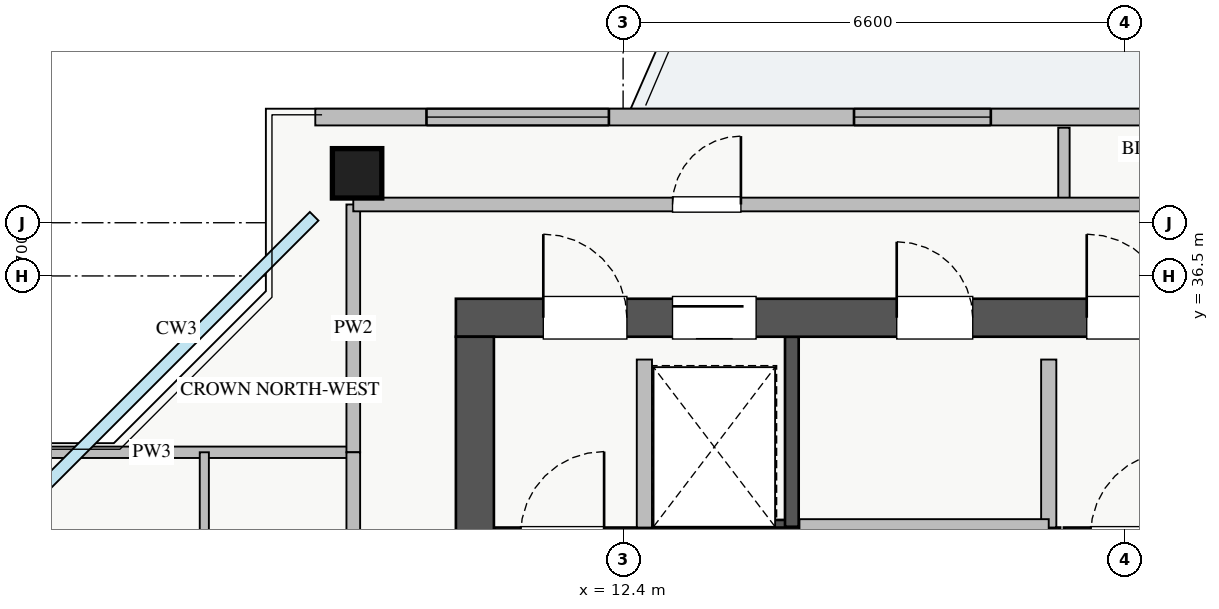
"""IFC4 building model, lengths in metres.
Left out: names, types, materials, properties, quantities, classifications, styles, units other than length and angle.
Written with IfcOpenShell. Run it as: python <this file> out.ifc"""

import sys

from ifc_helpers import new_model, si_unit, direction, frame, frame_2d, origin, origin_2d, place, context, subcontext, project, spatial, rectangle, extrude, source, transform, mapped, element, fill, save


model = new_model("IFC4")
c1 = context("Model", 3, precision=1e-05, world=origin(), true_north=direction((0.0, 1.0)))
c2 = subcontext(c1, "Body", "Model", "MODEL_VIEW")
j1 = project(units=[si_unit("LENGTHUNIT", "METRE"), si_unit("PLANEANGLEUNIT", "RADIAN")], contexts=[c1])
p1 = place(None, origin())
s1 = spatial("IfcSite", under=j1, at=p1, CompositionType="ELEMENT")
p2 = place(p1, origin())
s2 = spatial("IfcBuilding", under=s1, at=p2, CompositionType="ELEMENT")
p3 = place(p2, frame((0.0, 0.0, 247.0)))
s3 = spatial("IfcBuildingStorey", under=s2, at=p3, CompositionType="ELEMENT", Elevation=247.0)
p4 = place(p3, frame((12.68, 33.2, 0.0), z_axis=(0.0, 0.0, 1.0), x_axis=(1.0, 0.0, 0.0)))
e1 = element("IfcWall", 1, at=p4, inside=s3, PredefinedType="SHEAR", context=c2, shape_type="SweptSolid", body=[
    extrude(rectangle(XDim=1.94, YDim=0.18, at=frame_2d((0.97, 0.0))), origin(), (0.0, 0.0, 1.0), 3.07),
])
p5 = place(p3, frame((14.62, 33.2, 0.0), z_axis=(0.0, 0.0, 1.0), x_axis=(0.0, 1.0, 0.0)))
e2 = element("IfcWall", 2, at=p5, inside=s3, PredefinedType="SHEAR", context=c2, shape_type="SweptSolid", body=[
    extrude(rectangle(XDim=2.5, YDim=0.18, at=frame_2d((1.25, 0.0))), origin(), (0.0, 0.0, 1.0), 3.07),
])
p6 = place(p3, frame((10.7, 33.09, 0.0), z_axis=(0.0, 0.0, 1.0), x_axis=(1.0, 0.0, 0.0)))
e3 = element("IfcWall", 3, at=p6, inside=s3, PredefinedType="SHEAR", context=c2, shape_type="SweptSolid", body=[
    extrude(rectangle(XDim=7.45, YDim=0.2, at=frame_2d((3.725, 0.0))), origin(), (0.0, 0.0, 1.0), 3.25),
])
p7 = place(p6, frame((0.35, 0.0, 0.0)))
e4 = element("IfcOpeningElement", 4, at=p7, cuts=e3, PredefinedType="OPENING", context=c2, shape_type="SweptSolid", body=[
    extrude(rectangle(XDim=1.1, YDim=2.05, at=frame_2d((0.55, 1.025))), frame((0.0, 0.11, 0.0), z_axis=(0.0, -1.0, 0.0), x_axis=(1.0, 0.0, 0.0)), (0.0, 0.0, 1.0), 0.22),
])
p8 = place(p3, frame((18.2, 33.09, 0.0), z_axis=(0.0, 0.0, 1.0), x_axis=(1.0, 0.0, 0.0)))
e5 = element("IfcWall", 5, at=p8, inside=s3, PredefinedType="SHEAR", context=c2, shape_type="SweptSolid", body=[
    extrude(rectangle(XDim=7.15, YDim=0.2, at=frame_2d((3.575, 0.0))), origin(), (0.0, 0.0, 1.0), 3.25),
])
p9 = place(p8, frame((0.35, 0.0, 0.0)))
e6 = element("IfcOpeningElement", 6, at=p9, cuts=e5, PredefinedType="OPENING", context=c2, shape_type="SweptSolid", body=[
    extrude(rectangle(XDim=1.1, YDim=2.05, at=frame_2d((0.55, 1.025))), frame((0.0, 0.11, 0.0), z_axis=(0.0, -1.0, 0.0), x_axis=(1.0, 0.0, 0.0)), (0.0, 0.0, 1.0), 0.22),
])
p10 = place(p3, frame((10.2, 35.95, 0.0), z_axis=(0.0, 0.0, 1.0), x_axis=(1.0, 0.0, 0.0)))
e7 = element("IfcWall", 7, at=p10, inside=s3, PredefinedType="SHEAR", context=c2, shape_type="SweptSolid", body=[
    extrude(rectangle(XDim=17.6, YDim=0.5, at=frame_2d((8.8, 0.0))), origin(), (0.0, 0.0, 1.0), 3.25),
])
p11 = place(p10, frame((1.15, 0.0, 0.0)))
e8 = element("IfcOpeningElement", 8, at=p11, cuts=e7, PredefinedType="OPENING", context=c2, shape_type="SweptSolid", body=[
    extrude(rectangle(XDim=1.1, YDim=2.05, at=frame_2d((0.55, 1.025))), frame((0.0, 0.26, 0.0), z_axis=(0.0, -1.0, 0.0), x_axis=(1.0, 0.0, 0.0)), (0.0, 0.0, 1.0), 0.52),
])
p12 = place(p10, frame((8.3, 0.0, 0.0)))
e9 = element("IfcOpeningElement", 9, at=p12, cuts=e7, PredefinedType="OPENING", context=c2, shape_type="SweptSolid", body=[
    extrude(rectangle(XDim=1.1, YDim=2.05, at=frame_2d((0.55, 1.025))), frame((0.0, 0.26, 0.0), z_axis=(0.0, -1.0, 0.0), x_axis=(1.0, 0.0, 0.0)), (0.0, 0.0, 1.0), 0.52),
])
p13 = place(p10, frame((2.85, 0.0, 0.0)))
e10 = element("IfcOpeningElement", 10, at=p13, cuts=e7, PredefinedType="OPENING", context=c2, shape_type="SweptSolid", body=[
    extrude(rectangle(XDim=1.1, YDim=2.05, at=frame_2d((0.55, 1.025))), frame((0.0, 0.26, 0.0), z_axis=(0.0, -1.0, 0.0), x_axis=(1.0, 0.0, 0.0)), (0.0, 0.0, 1.0), 0.52),
])
p14 = place(p10, frame((5.8, 0.0, 0.0)))
e11 = element("IfcOpeningElement", 11, at=p14, cuts=e7, PredefinedType="OPENING", context=c2, shape_type="SweptSolid", body=[
    extrude(rectangle(XDim=1.0, YDim=2.05, at=frame_2d((0.5, 1.025))), frame((0.0, 0.26, 0.0), z_axis=(0.0, -1.0, 0.0), x_axis=(1.0, 0.0, 0.0)), (0.0, 0.0, 1.0), 0.52),
])
p15 = place(p10, frame((14.74, 0.0, 0.0)))
e12 = element("IfcOpeningElement", 12, at=p15, cuts=e7, PredefinedType="OPENING", context=c2, shape_type="SweptSolid", body=[
    extrude(rectangle(XDim=1.0, YDim=2.05, at=frame_2d((0.5, 1.025))), frame((0.0, 0.26, 0.0), z_axis=(0.0, -1.0, 0.0), x_axis=(1.0, 0.0, 0.0)), (0.0, 0.0, 1.0), 0.52),
])
p16 = place(p10, frame((10.175, 0.0, 0.0)))
e13 = element("IfcOpeningElement", 13, at=p16, cuts=e7, PredefinedType="OPENING", context=c2, shape_type="SweptSolid", body=[
    extrude(rectangle(XDim=1.0, YDim=2.05, at=frame_2d((0.5, 1.025))), frame((0.0, 0.26, 0.0), z_axis=(0.0, -1.0, 0.0), x_axis=(1.0, 0.0, 0.0)), (0.0, 0.0, 1.0), 0.52),
])
p17 = place(p10, frame((12.625, 0.0, 0.0)))
e14 = element("IfcOpeningElement", 14, at=p17, cuts=e7, PredefinedType="OPENING", context=c2, shape_type="SweptSolid", body=[
    extrude(rectangle(XDim=1.0, YDim=2.05, at=frame_2d((0.5, 1.025))), frame((0.0, 0.26, 0.0), z_axis=(0.0, -1.0, 0.0), x_axis=(1.0, 0.0, 0.0)), (0.0, 0.0, 1.0), 0.52),
])
p18 = place(p3, frame((10.45, 29.5, 0.0), z_axis=(0.0, 0.0, 1.0), x_axis=(0.0, 1.0, 0.0)))
e15 = element("IfcWall", 15, at=p18, inside=s3, PredefinedType="SHEAR", context=c2, shape_type="SweptSolid", body=[
    extrude(rectangle(XDim=6.2, YDim=0.5, at=frame_2d((3.1, 0.0))), origin(), (0.0, 0.0, 1.0), 3.25),
])
m1 = source(origin(), c2, "Body", "SweptSolid", [
    extrude(rectangle(XDim=0.65, YDim=0.65, at=origin_2d()), origin(), (0.0, 0.0, 1.0), 3.25),
])
p19 = place(p3, frame((8.9, 37.85, 0.0), z_axis=(0.0, 0.0, 1.0), x_axis=(1.0, 0.0, 0.0)))
e16 = element("IfcColumn", 16, at=p19, inside=s3, PredefinedType="COLUMN", context=c2, shape_type="MappedRepresentation", body=[
    mapped(m1, transform((0.0, 0.0, 0.0), x_axis=(1.0, 0.0, 0.0), y_axis=(0.0, 1.0, 0.0), z_axis=(0.0, 0.0, 1.0), scale=1.0)),
])
p20 = place(p3, frame((8.35, 38.59, 0.0), z_axis=(0.0, 0.0, 1.0), x_axis=(1.0, 0.0, 0.0)))
e17 = element("IfcWall", 17, at=p20, inside=s3, PredefinedType="STANDARD", context=c2, shape_type="SweptSolid", body=[
    extrude(rectangle(XDim=21.3, YDim=0.22, at=frame_2d((10.65, 0.0))), origin(), (0.0, 0.0, 1.0), 2.61),
])
p21 = place(p20, frame((11.5, 0.0, 0.0)))
e18 = element("IfcOpeningElement", 18, at=p21, cuts=e17, PredefinedType="OPENING", context=c2, shape_type="SweptSolid", body=[
    extrude(rectangle(XDim=1.2, YDim=2.1, at=frame_2d((0.6, 1.05))), frame((0.0, 0.12, 0.0), z_axis=(0.0, -1.0, 0.0), x_axis=(1.0, 0.0, 0.0)), (0.0, 0.0, 1.0), 0.24),
])
p22 = place(p20, frame((1.463, 0.0, 0.9)))
e19 = element("IfcOpeningElement", 19, at=p22, cuts=e17, PredefinedType="OPENING", context=c2, shape_type="SweptSolid", body=[
    extrude(rectangle(XDim=2.4, YDim=1.48, at=frame_2d((1.2, 0.74))), frame((0.0, 0.12, 0.0), z_axis=(0.0, -1.0, 0.0), x_axis=(1.0, 0.0, 0.0)), (0.0, 0.0, 1.0), 0.24),
])
p23 = place(p20, frame((7.088, 0.0, 0.9)))
e20 = element("IfcOpeningElement", 20, at=p23, cuts=e17, PredefinedType="OPENING", context=c2, shape_type="SweptSolid", body=[
    extrude(rectangle(XDim=1.8, YDim=1.45, at=frame_2d((0.9, 0.725))), frame((0.0, 0.12, 0.0), z_axis=(0.0, -1.0, 0.0), x_axis=(1.0, 0.0, 0.0)), (0.0, 0.0, 1.0), 0.24),
])
p24 = place(p20, frame((19.775, 0.0, 0.9)))
e21 = element("IfcOpeningElement", 21, at=p24, cuts=e17, PredefinedType="OPENING", context=c2, shape_type="SweptSolid", body=[
    extrude(rectangle(XDim=1.2, YDim=1.4, at=frame_2d((0.6, 0.7))), frame((0.0, 0.12, 0.0), z_axis=(0.0, -1.0, 0.0), x_axis=(1.0, 0.0, 0.0)), (0.0, 0.0, 1.0), 0.24),
])
p25 = place(p20, frame((14.86, 0.0, 0.9)))
e22 = element("IfcOpeningElement", 22, at=p25, cuts=e17, PredefinedType="OPENING", context=c2, shape_type="SweptSolid", body=[
    extrude(rectangle(XDim=2.4, YDim=1.5, at=frame_2d((1.2, 0.75))), frame((0.0, 0.12, 0.0), z_axis=(0.0, -1.0, 0.0), x_axis=(1.0, 0.0, 0.0)), (0.0, 0.0, 1.0), 0.24),
])
for number, where, z_axis, x_axis in (
    (23, (12.68, 33.19, 0.0), (0.0, 0.0, 1.0), (0.0, 1.0, 0.0)),
    (24, (18.0, 33.19, 0.0), (0.0, 0.0, 1.0), (0.0, 1.0, 0.0)),
):
    element("IfcWall", number, at=place(p3, frame(where, z_axis=z_axis, x_axis=x_axis)), inside=s3, PredefinedType="PARTITIONING", context=c2, shape_type="SweptSolid", body=[
        extrude(rectangle(XDim=2.21, YDim=0.2, at=frame_2d((1.105, 0.0))), origin(), (0.0, 0.0, 1.0), 3.07),
    ])
p26 = place(p3, frame((14.72, 33.2, 0.0), z_axis=(0.0, 0.0, 1.0), x_axis=(1.0, 0.0, 0.0)))
e25 = element("IfcWall", 25, at=p26, inside=s3, PredefinedType="PARTITIONING", context=c2, shape_type="SweptSolid", body=[
    extrude(rectangle(XDim=3.28, YDim=0.2, at=frame_2d((1.64, 0.0))), origin(), (0.0, 0.0, 1.0), 3.07),
])
p27 = place(p3, frame((3.55, 34.18, 0.0), z_axis=(0.0, 0.0, 1.0), x_axis=(1.0, 0.0, 0.0)))
e26 = element("IfcWall", 26, at=p27, inside=s3, PredefinedType="PARTITIONING", context=c2, shape_type="SweptSolid", body=[
    extrude(rectangle(XDim=5.3, YDim=0.15, at=frame_2d((2.65, 0.0))), origin(), (0.0, 0.0, 1.0), 3.07),
])
p28 = place(p3, frame((8.85, 34.18, 0.0), z_axis=(0.0, 0.0, 1.0), x_axis=(0.0, 1.0, 0.0)))
e27 = element("IfcWall", 27, at=p28, inside=s3, PredefinedType="PARTITIONING", context=c2, shape_type="SweptSolid", body=[
    extrude(rectangle(XDim=3.26, YDim=0.18, at=frame_2d((1.63, 0.0))), origin(), (0.0, 0.0, 1.0), 2.569),
])
p29 = place(p3, frame((18.2, 37.44, 0.0), z_axis=(0.0, 0.0, 1.0), x_axis=(0.0, 1.0, 0.0)))
e28 = element("IfcWall", 28, at=p29, inside=s3, PredefinedType="PARTITIONING", context=c2, shape_type="SweptSolid", body=[
    extrude(rectangle(XDim=1.01, YDim=0.15, at=frame_2d((0.505, 0.0))), origin(), (0.0, 0.0, 1.0), 3.07),
])
p30 = place(p3, frame((8.85, 37.44, 0.0), z_axis=(0.0, 0.0, 1.0), x_axis=(1.0, 0.0, 0.0)))
e29 = element("IfcWall", 29, at=p30, inside=s3, PredefinedType="PARTITIONING", context=c2, shape_type="SweptSolid", body=[
    extrude(rectangle(XDim=18.95, YDim=0.18, at=frame_2d((9.475, 0.0))), origin(), (0.0, 0.0, 1.0), 3.07),
])
p31 = place(p30, frame((4.2, 0.0, 0.0)))
e30 = element("IfcOpeningElement", 30, at=p31, cuts=e29, PredefinedType="OPENING", context=c2, shape_type="SweptSolid", body=[
    extrude(rectangle(XDim=0.9, YDim=2.05, at=frame_2d((0.45, 1.025))), frame((0.0, 0.1, 0.0), z_axis=(0.0, -1.0, 0.0), x_axis=(1.0, 0.0, 0.0)), (0.0, 0.0, 1.0), 0.2),
])
p32 = place(p30, frame((12.8, 0.0, 0.0)))
e31 = element("IfcOpeningElement", 31, at=p32, cuts=e29, PredefinedType="OPENING", context=c2, shape_type="SweptSolid", body=[
    extrude(rectangle(XDim=0.9, YDim=2.05, at=frame_2d((0.45, 1.025))), frame((0.0, 0.1, 0.0), z_axis=(0.0, -1.0, 0.0), x_axis=(1.0, 0.0, 0.0)), (0.0, 0.0, 1.0), 0.2),
])
p33 = place(p3, frame((6.89, 29.29, 0.0), z_axis=(0.0, 0.0, 1.0), x_axis=(0.0, 1.0, 0.0)))
e32 = element("IfcWall", 32, at=p33, inside=s3, PredefinedType="PLUMBINGWALL", context=c2, shape_type="SweptSolid", body=[
    extrude(rectangle(XDim=4.89, YDim=0.12, at=frame_2d((2.445, 0.0))), origin(), (0.0, 0.0, 1.0), 3.07),
])
p34 = place(p3, frame((8.85, 11.82, 0.0), z_axis=(0.0, 0.0, 1.0), x_axis=(0.0, 1.0, 0.0)))
e33 = element("IfcWall", 33, at=p34, inside=s3, PredefinedType="PARTITIONING", context=c2, shape_type="SweptSolid", body=[
    extrude(rectangle(XDim=22.36, YDim=0.18, at=frame_2d((11.18, 0.0))), origin(), (0.0, 0.0, 1.0), 2.569),
])
p35 = place(p34, frame((2.475, 0.0, 0.0)))
e34 = element("IfcOpeningElement", 34, at=p35, cuts=e33, PredefinedType="OPENING", context=c2, shape_type="SweptSolid", body=[
    extrude(rectangle(XDim=1.0, YDim=2.05, at=frame_2d((0.5, 1.025))), frame((0.0, 0.1, 0.0), z_axis=(0.0, -1.0, 0.0), x_axis=(1.0, 0.0, 0.0)), (0.0, 0.0, 1.0), 0.2),
])
p36 = place(p34, frame((13.91, 0.0, 0.0)))
e35 = element("IfcOpeningElement", 35, at=p36, cuts=e33, PredefinedType="OPENING", context=c2, shape_type="SweptSolid", body=[
    extrude(rectangle(XDim=1.0, YDim=2.05, at=frame_2d((0.5, 1.025))), frame((0.0, 0.1, 0.0), z_axis=(0.0, -1.0, 0.0), x_axis=(1.0, 0.0, 0.0)), (0.0, 0.0, 1.0), 0.2),
])
m2 = source(origin(), c2, "Body", "SweptSolid", [
    extrude(rectangle(XDim=2.4, YDim=1.48, at=frame_2d((1.2, 0.74))), frame((0.0, 0.03, 0.0), z_axis=(0.0, -1.0, 0.0), x_axis=(1.0, 0.0, 0.0)), (0.0, 0.0, 1.0), 0.06),
])
p37 = place(p22, origin())
e36 = element("IfcWindow", 36, at=p37, inside=s3, PartitioningType="TRIPLE_PANEL_VERTICAL", PredefinedType="WINDOW", context=c2, shape_type="MappedRepresentation", body=[
    mapped(m2, transform((0.0, 0.0, 0.0), x_axis=(1.0, 0.0, 0.0), y_axis=(0.0, 1.0, 0.0), z_axis=(0.0, 0.0, 1.0), scale=1.0)),
])
fill(e19, e36)
m3 = source(origin(), c2, "Body", "SweptSolid", [
    extrude(rectangle(XDim=1.8, YDim=1.45, at=frame_2d((0.9, 0.725))), frame((0.0, 0.03, 0.0), z_axis=(0.0, -1.0, 0.0), x_axis=(1.0, 0.0, 0.0)), (0.0, 0.0, 1.0), 0.06),
])
p38 = place(p23, origin())
e37 = element("IfcWindow", 37, at=p38, inside=s3, PartitioningType="DOUBLE_PANEL_VERTICAL", PredefinedType="WINDOW", context=c2, shape_type="MappedRepresentation", body=[
    mapped(m3, transform((0.0, 0.0, 0.0), x_axis=(1.0, 0.0, 0.0), y_axis=(0.0, 1.0, 0.0), z_axis=(0.0, 0.0, 1.0), scale=1.0)),
])
fill(e20, e37)
m4 = source(origin(), c2, "Body", "SweptSolid", [
    extrude(rectangle(XDim=1.1, YDim=2.05, at=frame_2d((0.55, 1.025))), frame((0.0, 0.025, 0.0), z_axis=(0.0, -1.0, 0.0), x_axis=(1.0, 0.0, 0.0)), (0.0, 0.0, 1.0), 0.05),
])
p39 = place(p11, origin())
e38 = element("IfcDoor", 38, at=p39, inside=s3, OperationType="SINGLE_SWING_LEFT", PredefinedType="DOOR", context=c2, shape_type="MappedRepresentation", body=[
    mapped(m4, transform((0.0, 0.0, 0.0), x_axis=(1.0, 0.0, 0.0), y_axis=(0.0, 1.0, 0.0), z_axis=(0.0, 0.0, 1.0), scale=1.0)),
])
fill(e8, e38)
p40 = place(p12, origin())
e39 = element("IfcDoor", 39, at=p40, inside=s3, OperationType="SINGLE_SWING_LEFT", PredefinedType="DOOR", context=c2, shape_type="MappedRepresentation", body=[
    mapped(m4, transform((0.0, 0.0, 0.0), x_axis=(1.0, 0.0, 0.0), y_axis=(0.0, 1.0, 0.0), z_axis=(0.0, 0.0, 1.0), scale=1.0)),
])
fill(e9, e39)
p41 = place(p13, origin())
e40 = element("IfcDoor", 40, at=p41, inside=s3, OperationType="SLIDING_TO_LEFT", PredefinedType="DOOR", context=c2, shape_type="MappedRepresentation", body=[
    mapped(m4, transform((0.0, 0.0, 0.0), x_axis=(1.0, 0.0, 0.0), y_axis=(0.0, 1.0, 0.0), z_axis=(0.0, 0.0, 1.0), scale=1.0)),
])
fill(e10, e40)
m5 = source(origin(), c2, "Body", "SweptSolid", [
    extrude(rectangle(XDim=1.0, YDim=2.05, at=frame_2d((0.5, 1.025))), frame((0.0, 0.025, 0.0), z_axis=(0.0, -1.0, 0.0), x_axis=(1.0, 0.0, 0.0)), (0.0, 0.0, 1.0), 0.05),
])
p42 = place(p14, origin())
e41 = element("IfcDoor", 41, at=p42, inside=s3, OperationType="SINGLE_SWING_LEFT", PredefinedType="DOOR", context=c2, shape_type="MappedRepresentation", body=[
    mapped(m5, transform((0.0, 0.0, 0.0), x_axis=(1.0, 0.0, 0.0), y_axis=(0.0, 1.0, 0.0), z_axis=(0.0, 0.0, 1.0), scale=1.0)),
])
fill(e11, e41)
m6 = source(origin(), c2, "Body", "SweptSolid", [
    extrude(rectangle(XDim=0.9, YDim=2.05, at=frame_2d((0.45, 1.025))), frame((0.0, 0.025, 0.0), z_axis=(0.0, -1.0, 0.0), x_axis=(1.0, 0.0, 0.0)), (0.0, 0.0, 1.0), 0.05),
])
p43 = place(p31, origin())
e42 = element("IfcDoor", 42, at=p43, inside=s3, OperationType="SINGLE_SWING_RIGHT", PredefinedType="DOOR", context=c2, shape_type="MappedRepresentation", body=[
    mapped(m6, transform((0.0, 0.0, 0.0), x_axis=(1.0, 0.0, 0.0), y_axis=(0.0, 1.0, 0.0), z_axis=(0.0, 0.0, 1.0), scale=1.0)),
])
fill(e30, e42)
save(model, sys.argv[1])
